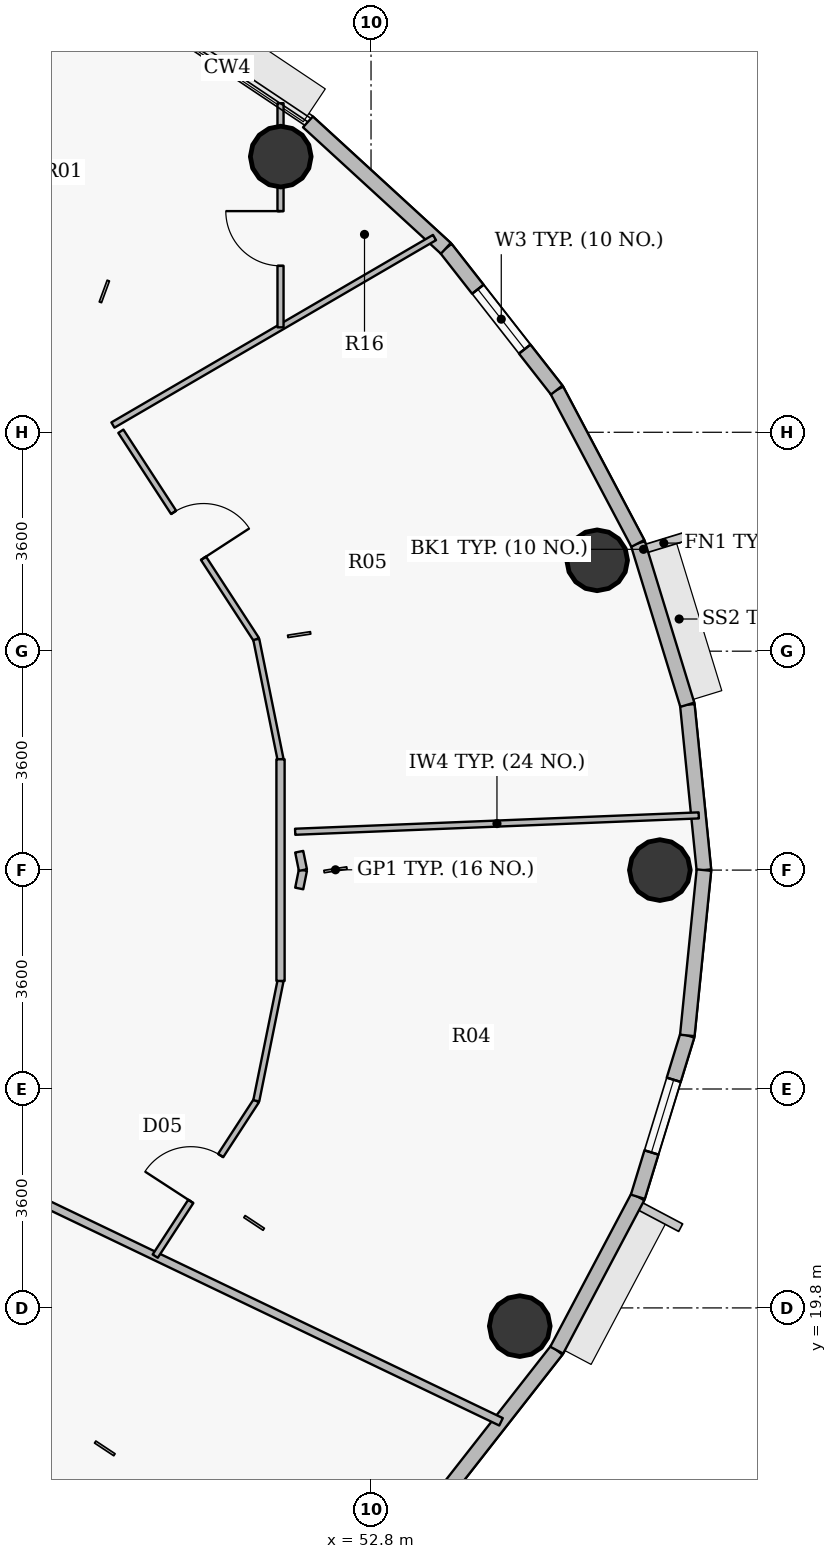
"""IFC4 building model, lengths in metres.
Left out: names, types, materials, properties, quantities, classifications, styles, units other than length and angle.
Written with IfcOpenShell. Run it as: python <this file> out.ifc"""

import sys

from ifc_helpers import new_model, si_unit, direction, frame, frame_2d, origin, origin_2d, place, context, subcontext, project, spatial, rectangle, hollow_circle, extrude, source, transform, mapped, element, fill, save


model = new_model("IFC4")
c1 = context("Model", 3, precision=1e-05, world=origin(), true_north=direction((0.0, 1.0)))
c2 = subcontext(c1, "Body", "Model", "MODEL_VIEW")
j1 = project(units=[si_unit("LENGTHUNIT", "METRE"), si_unit("PLANEANGLEUNIT", "RADIAN")], contexts=[c1])
p1 = place(None, origin())
s1 = spatial("IfcSite", under=j1, at=p1, CompositionType="ELEMENT")
p2 = place(p1, origin())
s2 = spatial("IfcBuilding", under=s1, at=p2, CompositionType="ELEMENT")
p3 = place(p2, frame((0.0, 0.0, 310.5)))
s3 = spatial("IfcBuildingStorey", under=s2, at=p3, CompositionType="ELEMENT", Elevation=310.5)
for number, where, z_axis, x_axis in (
    (1, (57.55, 27.0, 0.0), (0.0, 0.0, 1.0), (1.0, 0.0, 0.0)),
    (2, (56.519, 32.094, 0.0), (0.0, 0.0, 1.0), (1.0, 0.0, 0.0)),
    (3, (51.315, 38.733, 0.0), (0.0, 0.0, 1.0), (1.0, 0.0, 0.0)),
    (4, (55.246, 19.5, 0.0), (0.0, 0.0, 1.0), (1.0, 0.0, 0.0)),
):
    element("IfcColumn", number, at=place(p3, frame(where, z_axis=z_axis, x_axis=x_axis)), inside=s3, PredefinedType="COLUMN", context=c2, shape_type="SweptSolid", body=[
        extrude(hollow_circle(Radius=0.5, WallThickness=0.032, at=origin_2d()), origin(), (0.0, 0.0, 1.0), 3.75),
    ])
p4 = place(p3, frame((58.002, 29.719, 0.0), z_axis=(0.0, 0.0, 1.0), x_axis=(0.099972526841, -0.99499019788, 0.0)))
e5 = element("IfcWall", 5, at=p4, inside=s3, PredefinedType="SOLIDWALL", context=c2, shape_type="SweptSolid", body=[
    extrude(rectangle(XDim=2.733, YDim=0.24, at=frame_2d((1.366, 0.0))), origin(), (0.0, 0.0, 1.0), 3.5),
])
p5 = place(p3, frame((57.188, 32.372, 0.0), z_axis=(0.0, 0.0, 1.0), x_axis=(0.2931213403, -0.956075248012, 0.0)))
e6 = element("IfcWall", 6, at=p5, inside=s3, PredefinedType="SOLIDWALL", context=c2, shape_type="SweptSolid", body=[
    extrude(rectangle(XDim=2.775, YDim=0.24, at=frame_2d((1.388, 0.0))), origin(), (0.0, 0.0, 1.0), 3.5),
])
p6 = place(p3, frame((55.854, 34.895, 0.0), z_axis=(0.0, 0.0, 1.0), x_axis=(0.467628269026, -0.883925224218, 0.0)))
e7 = element("IfcWall", 7, at=p6, inside=s3, PredefinedType="SOLIDWALL", context=c2, shape_type="SweptSolid", body=[
    extrude(rectangle(XDim=2.854, YDim=0.24, at=frame_2d((1.427, 0.0))), origin(), (0.0, 0.0, 1.0), 3.5),
])
p7 = place(p3, frame((54.03, 37.225, 0.0), z_axis=(0.0, 0.0, 1.0), x_axis=(0.616337186556, -0.787482363275, 0.0)))
e8 = element("IfcWall", 8, at=p7, inside=s3, PredefinedType="SOLIDWALL", context=c2, shape_type="SweptSolid", body=[
    extrude(rectangle(XDim=2.958, YDim=0.24, at=frame_2d((1.479, 0.0))), origin(), (0.0, 0.0, 1.0), 3.5),
])
p8 = place(p7, frame((0.854, 0.0, 0.9)))
e9 = element("IfcOpeningElement", 9, at=p8, cuts=e8, PredefinedType="OPENING", context=c2, shape_type="SweptSolid", body=[
    extrude(rectangle(XDim=1.25, YDim=1.65, at=origin_2d()), frame((0.625, 0.13, 0.825), z_axis=(0.0, -1.0, 0.0), x_axis=(1.0, 0.0, 0.0)), (0.0, 0.0, 1.0), 0.26),
])
p9 = place(p3, frame((51.762, 39.304, 0.0), z_axis=(0.0, 0.0, 1.0), x_axis=(0.737068506972, -0.675818034703, 0.0)))
e10 = element("IfcWall", 10, at=p9, inside=s3, PredefinedType="SOLIDWALL", context=c2, shape_type="SweptSolid", body=[
    extrude(rectangle(XDim=3.077, YDim=0.24, at=frame_2d((1.539, 0.0))), origin(), (0.0, 0.0, 1.0), 3.5),
])
p10 = place(p3, frame((55.854, 19.105, 0.0), z_axis=(0.0, 0.0, 1.0), x_axis=(-0.616337186556, -0.787482363275, 0.0)))
e11 = element("IfcWall", 11, at=p10, inside=s3, PredefinedType="SOLIDWALL", context=c2, shape_type="SweptSolid", body=[
    extrude(rectangle(XDim=2.958, YDim=0.24, at=frame_2d((1.479, 0.0))), origin(), (0.0, 0.0, 1.0), 3.5),
])
p11 = place(p3, frame((57.188, 21.628, 0.0), z_axis=(0.0, 0.0, 1.0), x_axis=(-0.467628269026, -0.883925224218, 0.0)))
e12 = element("IfcWall", 12, at=p11, inside=s3, PredefinedType="SOLIDWALL", context=c2, shape_type="SweptSolid", body=[
    extrude(rectangle(XDim=2.854, YDim=0.24, at=frame_2d((1.427, 0.0))), origin(), (0.0, 0.0, 1.0), 3.5),
])
p12 = place(p3, frame((58.002, 24.281, 0.0), z_axis=(0.0, 0.0, 1.0), x_axis=(-0.2931213403, -0.956075248012, 0.0)))
e13 = element("IfcWall", 13, at=p12, inside=s3, PredefinedType="SOLIDWALL", context=c2, shape_type="SweptSolid", body=[
    extrude(rectangle(XDim=2.775, YDim=0.24, at=frame_2d((1.388, 0.0))), origin(), (0.0, 0.0, 1.0), 3.5),
])
p13 = place(p12, frame((0.763, 0.0, 0.9)))
e14 = element("IfcOpeningElement", 14, at=p13, cuts=e13, PredefinedType="OPENING", context=c2, shape_type="SweptSolid", body=[
    extrude(rectangle(XDim=1.25, YDim=1.65, at=origin_2d()), frame((0.625, 0.13, 0.825), z_axis=(0.0, -1.0, 0.0), x_axis=(1.0, 0.0, 0.0)), (0.0, 0.0, 1.0), 0.26),
])
p14 = place(p3, frame((58.275, 27.0, 0.0), z_axis=(0.0, 0.0, 1.0), x_axis=(-0.099972526841, -0.99499019788, 0.0)))
e15 = element("IfcWall", 15, at=p14, inside=s3, PredefinedType="SOLIDWALL", context=c2, shape_type="SweptSolid", body=[
    extrude(rectangle(XDim=2.733, YDim=0.24, at=frame_2d((1.366, 0.0))), origin(), (0.0, 0.0, 1.0), 3.5),
])
p15 = place(p3, frame((47.05, 21.706, 0.0), z_axis=(0.0, 0.0, 1.0), x_axis=(0.901842087785, -0.432065792096, 0.0)))
e16 = element("IfcWall", 16, at=p15, inside=s3, PredefinedType="PARTITIONING", context=c2, shape_type="SweptSolid", body=[
    extrude(rectangle(XDim=8.747, YDim=0.135, at=frame_2d((4.373, 0.0))), origin(), (0.0, 0.0, 1.0), 2.985),
])
p16 = place(p3, frame((48.555, 34.319, 0.0), z_axis=(0.0, 0.0, 1.0), x_axis=(0.863923501635, 0.503623056783, 0.0)))
e17 = element("IfcWall", 17, at=p16, inside=s3, PredefinedType="PARTITIONING", context=c2, shape_type="SweptSolid", body=[
    extrude(rectangle(XDim=6.122, YDim=0.1, at=frame_2d((3.061, 0.0))), origin(), (0.0, 0.0, 1.0), 2.985),
])
p17 = place(p3, frame((48.685, 34.217, 0.0), z_axis=(0.0, 0.0, 1.0), x_axis=(0.545435886628, -0.838152547916, 0.0)))
e18 = element("IfcWall", 18, at=p17, inside=s3, PredefinedType="PARTITIONING", context=c2, shape_type="SweptSolid", body=[
    extrude(rectangle(XDim=4.083, YDim=0.1, at=frame_2d((2.042, 0.0))), origin(), (0.0, 0.0, 1.0), 3.035),
])
p18 = place(p17, frame((1.592, 0.0, 0.0)))
e19 = element("IfcOpeningElement", 19, at=p18, cuts=e18, PredefinedType="OPENING", context=c2, shape_type="SweptSolid", body=[
    extrude(rectangle(XDim=0.9, YDim=2.1, at=origin_2d()), frame((0.45, 0.06, 1.05), z_axis=(0.0, -1.0, 0.0), x_axis=(1.0, 0.0, 0.0)), (0.0, 0.0, 1.0), 0.12),
])
p19 = place(p3, frame((49.25, 20.652, 0.0), z_axis=(0.0, 0.0, 1.0), x_axis=(0.54545856642, 0.838137788385, 0.0)))
e20 = element("IfcWall", 20, at=p19, inside=s3, PredefinedType="PARTITIONING", context=c2, shape_type="SweptSolid", body=[
    extrude(rectangle(XDim=3.047, YDim=0.1, at=frame_2d((1.523, 0.0))), origin(), (0.0, 0.0, 1.0), 3.035),
])
p20 = place(p19, frame((1.073, 0.0, 0.0)))
e21 = element("IfcOpeningElement", 21, at=p20, cuts=e20, PredefinedType="OPENING", context=c2, shape_type="SweptSolid", body=[
    extrude(rectangle(XDim=0.9, YDim=2.1, at=origin_2d()), frame((0.45, 0.06, 1.05), z_axis=(0.0, -1.0, 0.0), x_axis=(1.0, 0.0, 0.0)), (0.0, 0.0, 1.0), 0.12),
])
p21 = place(p3, frame((50.913, 23.206, 0.0), z_axis=(0.0, 0.0, 1.0), x_axis=(0.198192944621, 0.980163025574, 0.0)))
e22 = element("IfcWall", 22, at=p21, inside=s3, PredefinedType="PARTITIONING", context=c2, shape_type="SweptSolid", body=[
    extrude(rectangle(XDim=2.011, YDim=0.1, at=frame_2d((1.006, 0.0))), origin(), (0.0, 0.0, 1.0), 3.5),
])
p22 = place(p3, frame((50.913, 30.794, 0.0), z_axis=(0.0, 0.0, 1.0), x_axis=(0.198192944621, -0.980163025574, 0.0)))
e23 = element("IfcWall", 23, at=p22, inside=s3, PredefinedType="PARTITIONING", context=c2, shape_type="SweptSolid", body=[
    extrude(rectangle(XDim=2.011, YDim=0.1, at=frame_2d((1.006, 0.0))), origin(), (0.0, 0.0, 1.0), 3.035),
])
p23 = place(p3, frame((51.311, 35.926, 0.0), z_axis=(0.0, 0.0, 1.0), x_axis=(0.0, 1.0, 0.0)))
e24 = element("IfcWall", 24, at=p23, inside=s3, PredefinedType="PARTITIONING", context=c2, shape_type="SweptSolid", body=[
    extrude(rectangle(XDim=3.686, YDim=0.1, at=frame_2d((1.843, 0.0))), origin(), (0.0, 0.0, 1.0), 3.5),
])
p24 = place(p23, frame((1.011, 0.0, 0.0)))
e25 = element("IfcOpeningElement", 25, at=p24, cuts=e24, PredefinedType="OPENING", context=c2, shape_type="SweptSolid", body=[
    extrude(rectangle(XDim=0.9, YDim=2.1, at=origin_2d()), frame((0.45, 0.06, 1.05), z_axis=(0.0, -1.0, 0.0), x_axis=(1.0, 0.0, 0.0)), (0.0, 0.0, 1.0), 0.12),
])
p25 = place(p3, frame((51.552, 27.63, 0.0), z_axis=(0.0, 0.0, 1.0), x_axis=(0.999179444864, 0.040502308109, 0.0)))
e26 = element("IfcWall", 26, at=p25, inside=s3, PredefinedType="PARTITIONING", context=c2, shape_type="SweptSolid", body=[
    extrude(rectangle(XDim=6.643, YDim=0.1, at=frame_2d((3.321, 0.0))), origin(), (0.0, 0.0, 1.0), 2.985),
])
p26 = place(p3, frame((51.311, 28.823, 0.0), z_axis=(0.0, 0.0, 1.0), x_axis=(0.0, -1.0, 0.0)))
e27 = element("IfcWall", 27, at=p26, inside=s3, PredefinedType="PARTITIONING", context=c2, shape_type="SweptSolid", body=[
    extrude(rectangle(XDim=3.645, YDim=0.135, at=frame_2d((1.823, 0.0))), origin(), (0.0, 0.0, 1.0), 3.035),
])
for number, where, z_axis, x_axis in (
    (28, (51.619, 26.698, 0.0), (0.0, 0.0, 1.0), (0.198, 0.98, 0.0)),
    (29, (51.68, 27.0, 0.0), (0.0, 0.0, 1.0), (-0.198, 0.98, 0.0)),
):
    element("IfcWall", number, at=place(p3, frame(where, z_axis=z_axis, x_axis=x_axis)), inside=s3, PredefinedType="PARTITIONING", context=c2, shape_type="SweptSolid", body=[
        extrude(rectangle(XDim=0.308, YDim=0.135, at=frame_2d((0.154, 0.0))), origin(), (0.0, 0.0, 1.0), 3.035),
    ])
m1 = source(origin(), c2, "Body", "SweptSolid", [
    extrude(rectangle(XDim=1.25, YDim=1.65, at=origin_2d()), frame((0.625, 0.03, 0.825), z_axis=(0.0, -1.0, 0.0), x_axis=(1.0, 0.0, 0.0)), (0.0, 0.0, 1.0), 0.06),
])
p27 = place(p8, origin())
e30 = element("IfcWindow", 30, at=p27, inside=s3, PartitioningType="SINGLE_PANEL", PredefinedType="WINDOW", context=c2, shape_type="MappedRepresentation", body=[
    mapped(m1, transform((0.0, 0.0, 0.0), x_axis=(1.0, 0.0, 0.0), y_axis=(0.0, 1.0, 0.0), z_axis=(0.0, 0.0, 1.0), scale=1.0)),
])
fill(e9, e30)
p28 = place(p13, origin())
e31 = element("IfcWindow", 31, at=p28, inside=s3, PartitioningType="SINGLE_PANEL", PredefinedType="WINDOW", context=c2, shape_type="MappedRepresentation", body=[
    mapped(m1, transform((0.0, 0.0, 0.0), x_axis=(1.0, 0.0, 0.0), y_axis=(0.0, 1.0, 0.0), z_axis=(0.0, 0.0, 1.0), scale=1.0)),
])
fill(e14, e31)
m2 = source(origin(), c2, "Body", "SweptSolid", [
    extrude(rectangle(XDim=0.9, YDim=2.1, at=origin_2d()), frame((0.45, 0.025, 1.05), z_axis=(0.0, -1.0, 0.0), x_axis=(1.0, 0.0, 0.0)), (0.0, 0.0, 1.0), 0.05),
])
p29 = place(p20, origin())
e32 = element("IfcDoor", 32, at=p29, inside=s3, OperationType="SINGLE_SWING_LEFT", PredefinedType="DOOR", context=c2, shape_type="MappedRepresentation", body=[
    mapped(m2, transform((0.0, 0.0, 0.0), x_axis=(1.0, 0.0, 0.0), y_axis=(0.0, 1.0, 0.0), z_axis=(0.0, 0.0, 1.0), scale=1.0)),
])
fill(e21, e32)
p30 = place(p18, origin())
e33 = element("IfcDoor", 33, at=p30, inside=s3, OperationType="SINGLE_SWING_RIGHT", PredefinedType="DOOR", context=c2, shape_type="MappedRepresentation", body=[
    mapped(m2, transform((0.0, 0.0, 0.0), x_axis=(1.0, 0.0, 0.0), y_axis=(0.0, 1.0, 0.0), z_axis=(0.0, 0.0, 1.0), scale=1.0)),
])
fill(e19, e33)
p31 = place(p24, origin())
e34 = element("IfcDoor", 34, at=p31, inside=s3, OperationType="SINGLE_SWING_RIGHT", PredefinedType="DOOR", context=c2, shape_type="MappedRepresentation", body=[
    mapped(m2, transform((0.0, 0.0, 0.0), x_axis=(1.0, 0.0, 0.0), y_axis=(0.0, 1.0, 0.0), z_axis=(0.0, 0.0, 1.0), scale=1.0)),
])
fill(e25, e34)
save(model, sys.argv[1])
